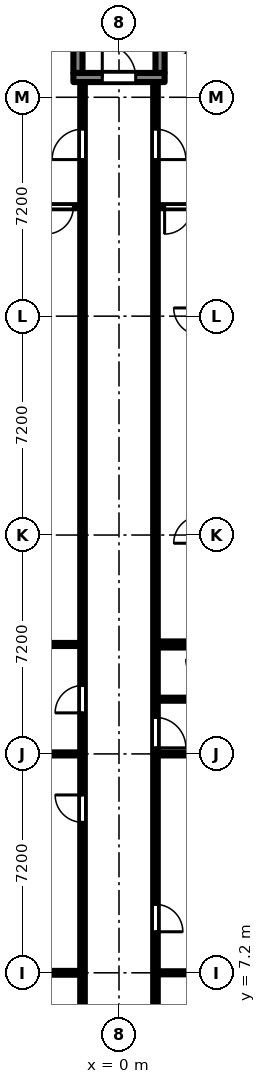
"""IFC4 building model, lengths in metres.
Left out: names, types, materials, properties, quantities, classifications, styles, units other than length and angle.
Written with IfcOpenShell. Run it as: python <this file> out.ifc"""

import sys

from ifc_helpers import new_model, si_unit, direction, frame, frame_2d, origin, place, context, subcontext, project, spatial, rectangle, extrude, element, fill, save


model = new_model("IFC4")
c1 = context("Model", 3, precision=1e-05, world=origin(), true_north=direction((0.0, 1.0)))
c2 = subcontext(c1, "Body", "Model", "MODEL_VIEW")
j1 = project(units=[si_unit("LENGTHUNIT", "METRE"), si_unit("PLANEANGLEUNIT", "RADIAN")], contexts=[c1])
p1 = place(None, origin())
s1 = spatial("IfcSite", under=j1, at=p1, CompositionType="ELEMENT")
p2 = place(p1, origin())
s2 = spatial("IfcBuilding", under=s1, at=p2, CompositionType="ELEMENT")
p3 = place(p2, frame((0.0, 0.0, 29.7)))
s3 = spatial("IfcBuildingStorey", under=s2, at=p3, CompositionType="ELEMENT", Elevation=29.7)
p4 = place(p3, frame((-1.5, 36.65, 0.0), z_axis=(0.0, 0.0, 1.0), x_axis=(1.0, 0.0, 0.0)))
e1 = element("IfcWall", 1, at=p4, inside=s3, PredefinedType="SHEAR", context=c2, shape_type="SweptSolid", body=[
    extrude(rectangle(XDim=3.0, YDim=0.3, at=frame_2d((1.5, 0.0))), origin(), (0.0, 0.0, 1.0), 2.575),
])
p5 = place(p4, frame((0.95, 0.0, 0.0)))
e2 = element("IfcOpeningElement", 2, at=p5, cuts=e1, PredefinedType="OPENING", context=c2, shape_type="SweptSolid", body=[
    extrude(rectangle(XDim=1.1, YDim=2.1, at=frame_2d((0.55, 1.05))), frame((0.0, 0.16, 0.0), z_axis=(0.0, -1.0, 0.0), x_axis=(1.0, 0.0, 0.0)), (0.0, 0.0, 1.0), 0.32),
])
for number, where, z_axis, x_axis in (
    (3, (-1.35, 36.8, 0.0), (0.0, 0.0, 1.0), (0.0, 1.0, 0.0)),
    (4, (1.35, 36.8, 0.0), (0.0, 0.0, 1.0), (0.0, 1.0, 0.0)),
):
    element("IfcWall", number, at=place(p3, frame(where, z_axis=z_axis, x_axis=x_axis)), inside=s3, PredefinedType="SHEAR", context=c2, shape_type="SweptSolid", body=[
        extrude(rectangle(XDim=5.8, YDim=0.3, at=frame_2d((2.9, 0.0))), origin(), (0.0, 0.0, 1.0), 2.575),
    ])
p6 = place(p3, frame((-6.9, 18.0, 0.0), z_axis=(0.0, 0.0, 1.0), x_axis=(1.0, 0.0, 0.0)))
e5 = element("IfcWall", 5, at=p6, inside=s3, PredefinedType="PARTITIONING", context=c2, shape_type="SweptSolid", body=[
    extrude(rectangle(XDim=5.625, YDim=0.1, at=frame_2d((2.812, 0.0))), origin(), (0.0, 0.0, 1.0), 2.575),
])
p7 = place(p3, frame((-6.9, 32.4, 0.0), z_axis=(0.0, 0.0, 1.0), x_axis=(1.0, 0.0, 0.0)))
e6 = element("IfcWall", 6, at=p7, inside=s3, PredefinedType="PARTITIONING", context=c2, shape_type="SweptSolid", body=[
    extrude(rectangle(XDim=5.625, YDim=0.1, at=frame_2d((2.812, 0.0))), origin(), (0.0, 0.0, 1.0), 2.575),
])
p8 = place(p7, frame((4.5, 0.0, 0.0)))
e7 = element("IfcOpeningElement", 7, at=p8, cuts=e6, PredefinedType="OPENING", context=c2, shape_type="SweptSolid", body=[
    extrude(rectangle(XDim=0.9, YDim=2.1, at=frame_2d((0.45, 1.05))), frame((0.0, 0.06, 0.0), z_axis=(0.0, -1.0, 0.0), x_axis=(1.0, 0.0, 0.0)), (0.0, 0.0, 1.0), 0.12),
])
p9 = place(p3, frame((-3.9, 7.2, 0.0), z_axis=(0.0, 0.0, 1.0), x_axis=(1.0, 0.0, 0.0)))
e8 = element("IfcWall", 8, at=p9, inside=s3, PredefinedType="PARTITIONING", context=c2, shape_type="SweptSolid", body=[
    extrude(rectangle(XDim=2.625, YDim=0.125, at=frame_2d((1.312, 0.0))), origin(), (0.0, 0.0, 1.0), 2.575),
])
p10 = place(p3, frame((-3.9, 14.4, 0.0), z_axis=(0.0, 0.0, 1.0), x_axis=(1.0, 0.0, 0.0)))
e9 = element("IfcWall", 9, at=p10, inside=s3, PredefinedType="PARTITIONING", context=c2, shape_type="SweptSolid", body=[
    extrude(rectangle(XDim=2.625, YDim=0.1, at=frame_2d((1.312, 0.0))), origin(), (0.0, 0.0, 1.0), 2.575),
])
p11 = place(p3, frame((-1.2, 1.125, 0.0), z_axis=(0.0, 0.0, 1.0), x_axis=(0.0, 1.0, 0.0)))
e10 = element("IfcWall", 10, at=p11, inside=s3, PredefinedType="PARTITIONING", context=c2, shape_type="SweptSolid", body=[
    extrude(rectangle(XDim=35.375, YDim=0.15, at=frame_2d((17.688, 0.0))), origin(), (0.0, 0.0, 1.0), 2.575),
])
p12 = place(p11, frame((2.625, 0.0, 0.0)))
e11 = element("IfcOpeningElement", 11, at=p12, cuts=e10, PredefinedType="OPENING", context=c2, shape_type="SweptSolid", body=[
    extrude(rectangle(XDim=0.9, YDim=2.1, at=frame_2d((0.45, 1.05))), frame((0.0, 0.085, 0.0), z_axis=(0.0, -1.0, 0.0), x_axis=(1.0, 0.0, 0.0)), (0.0, 0.0, 1.0), 0.17),
])
p13 = place(p11, frame((11.025, 0.0, 0.0)))
e12 = element("IfcOpeningElement", 12, at=p13, cuts=e10, PredefinedType="OPENING", context=c2, shape_type="SweptSolid", body=[
    extrude(rectangle(XDim=0.9, YDim=2.1, at=frame_2d((0.45, 1.05))), frame((0.0, 0.085, 0.0), z_axis=(0.0, -1.0, 0.0), x_axis=(1.0, 0.0, 0.0)), (0.0, 0.0, 1.0), 0.17),
])
p14 = place(p11, frame((14.625, 0.0, 0.0)))
e13 = element("IfcOpeningElement", 13, at=p14, cuts=e10, PredefinedType="OPENING", context=c2, shape_type="SweptSolid", body=[
    extrude(rectangle(XDim=0.9, YDim=2.1, at=frame_2d((0.45, 1.05))), frame((0.0, 0.085, 0.0), z_axis=(0.0, -1.0, 0.0), x_axis=(1.0, 0.0, 0.0)), (0.0, 0.0, 1.0), 0.17),
])
p15 = place(p11, frame((32.825, 0.0, 0.0)))
e14 = element("IfcOpeningElement", 14, at=p15, cuts=e10, PredefinedType="OPENING", context=c2, shape_type="SweptSolid", body=[
    extrude(rectangle(XDim=1.0, YDim=2.1, at=frame_2d((0.5, 1.05))), frame((0.0, 0.085, 0.0), z_axis=(0.0, -1.0, 0.0), x_axis=(1.0, 0.0, 0.0)), (0.0, 0.0, 1.0), 0.17),
])
p16 = place(p3, frame((1.2, 1.125, 0.0), z_axis=(0.0, 0.0, 1.0), x_axis=(0.0, 1.0, 0.0)))
e15 = element("IfcWall", 15, at=p16, inside=s3, PredefinedType="PARTITIONING", context=c2, shape_type="SweptSolid", body=[
    extrude(rectangle(XDim=35.375, YDim=0.15, at=frame_2d((17.688, 0.0))), origin(), (0.0, 0.0, 1.0), 2.575),
])
p17 = place(p16, frame((3.725, 0.0, 0.0)))
e16 = element("IfcOpeningElement", 16, at=p17, cuts=e15, PredefinedType="OPENING", context=c2, shape_type="SweptSolid", body=[
    extrude(rectangle(XDim=0.9, YDim=2.1, at=frame_2d((0.45, 1.05))), frame((0.0, 0.085, 0.0), z_axis=(0.0, -1.0, 0.0), x_axis=(1.0, 0.0, 0.0)), (0.0, 0.0, 1.0), 0.17),
])
p18 = place(p16, frame((7.425, 0.0, 0.0)))
e17 = element("IfcOpeningElement", 17, at=p18, cuts=e15, PredefinedType="OPENING", context=c2, shape_type="SweptSolid", body=[
    extrude(rectangle(XDim=0.9, YDim=2.1, at=frame_2d((0.45, 1.05))), frame((0.0, 0.085, 0.0), z_axis=(0.0, -1.0, 0.0), x_axis=(1.0, 0.0, 0.0)), (0.0, 0.0, 1.0), 0.17),
])
p19 = place(p16, frame((13.475, 0.0, 0.0)))
e18 = element("IfcOpeningElement", 18, at=p19, cuts=e15, PredefinedType="OPENING", context=c2, shape_type="SweptSolid", body=[
    extrude(rectangle(XDim=1.0, YDim=2.1, at=frame_2d((0.5, 1.05))), frame((0.0, 0.085, 0.0), z_axis=(0.0, -1.0, 0.0), x_axis=(1.0, 0.0, 0.0)), (0.0, 0.0, 1.0), 0.17),
])
p20 = place(p16, frame((32.825, 0.0, 0.0)))
e19 = element("IfcOpeningElement", 19, at=p20, cuts=e15, PredefinedType="OPENING", context=c2, shape_type="SweptSolid", body=[
    extrude(rectangle(XDim=1.0, YDim=2.1, at=frame_2d((0.5, 1.05))), frame((0.0, 0.085, 0.0), z_axis=(0.0, -1.0, 0.0), x_axis=(1.0, 0.0, 0.0)), (0.0, 0.0, 1.0), 0.17),
])
for number, where, z_axis, x_axis in (
    (20, (1.275, 7.2, 0.0), (0.0, 0.0, 1.0), (1.0, 0.0, 0.0)),
    (21, (1.275, 14.4, 0.0), (0.0, 0.0, 1.0), (1.0, 0.0, 0.0)),
):
    element("IfcWall", number, at=place(p3, frame(where, z_axis=z_axis, x_axis=x_axis)), inside=s3, PredefinedType="PARTITIONING", context=c2, shape_type="SweptSolid", body=[
        extrude(rectangle(XDim=2.625, YDim=0.1, at=frame_2d((1.312, 0.0))), origin(), (0.0, 0.0, 1.0), 2.575),
    ])
p21 = place(p3, frame((1.275, 16.2, 0.0), z_axis=(0.0, 0.0, 1.0), x_axis=(1.0, 0.0, 0.0)))
e22 = element("IfcWall", 22, at=p21, inside=s3, PredefinedType="PARTITIONING", context=c2, shape_type="SweptSolid", body=[
    extrude(rectangle(XDim=1.775, YDim=0.1, at=frame_2d((0.888, 0.0))), origin(), (0.0, 0.0, 1.0), 2.575),
])
p22 = place(p3, frame((1.275, 18.0, 0.0), z_axis=(0.0, 0.0, 1.0), x_axis=(1.0, 0.0, 0.0)))
e23 = element("IfcWall", 23, at=p22, inside=s3, PredefinedType="PARTITIONING", context=c2, shape_type="SweptSolid", body=[
    extrude(rectangle(XDim=1.475, YDim=0.2, at=frame_2d((0.738, 0.0))), origin(), (0.0, 0.0, 1.0), 2.575),
])
p23 = place(p3, frame((1.275, 32.4, 0.0), z_axis=(0.0, 0.0, 1.0), x_axis=(1.0, 0.0, 0.0)))
e24 = element("IfcWall", 24, at=p23, inside=s3, PredefinedType="PARTITIONING", context=c2, shape_type="SweptSolid", body=[
    extrude(rectangle(XDim=5.625, YDim=0.1, at=frame_2d((2.812, 0.0))), origin(), (0.0, 0.0, 1.0), 2.575),
])
p24 = place(p23, frame((0.225, 0.0, 0.0)))
e25 = element("IfcOpeningElement", 25, at=p24, cuts=e24, PredefinedType="OPENING", context=c2, shape_type="SweptSolid", body=[
    extrude(rectangle(XDim=0.9, YDim=2.1, at=frame_2d((0.45, 1.05))), frame((0.0, 0.06, 0.0), z_axis=(0.0, -1.0, 0.0), x_axis=(1.0, 0.0, 0.0)), (0.0, 0.0, 1.0), 0.12),
])
p25 = place(p5, origin())
e26 = element("IfcDoor", 26, at=p25, inside=s3, OperationType="SINGLE_SWING_LEFT", PredefinedType="DOOR", context=c2, shape_type="SweptSolid", body=[
    extrude(rectangle(XDim=1.1, YDim=2.1, at=frame_2d((0.55, 1.05))), frame((0.0, 0.025, 0.0), z_axis=(0.0, -1.0, 0.0), x_axis=(1.0, 0.0, 0.0)), (0.0, 0.0, 1.0), 0.05),
])
fill(e2, e26)
p26 = place(p13, origin())
e27 = element("IfcDoor", 27, at=p26, inside=s3, OperationType="SINGLE_SWING_RIGHT", PredefinedType="DOOR", context=c2, shape_type="SweptSolid", body=[
    extrude(rectangle(XDim=0.9, YDim=2.1, at=frame_2d((0.45, 1.05))), frame((0.0, 0.025, 0.0), z_axis=(0.0, -1.0, 0.0), x_axis=(1.0, 0.0, 0.0)), (0.0, 0.0, 1.0), 0.05),
])
fill(e12, e27)
p27 = place(p14, origin())
e28 = element("IfcDoor", 28, at=p27, inside=s3, OperationType="SINGLE_SWING_LEFT", PredefinedType="DOOR", context=c2, shape_type="SweptSolid", body=[
    extrude(rectangle(XDim=0.9, YDim=2.1, at=frame_2d((0.45, 1.05))), frame((0.0, 0.025, 0.0), z_axis=(0.0, -1.0, 0.0), x_axis=(1.0, 0.0, 0.0)), (0.0, 0.0, 1.0), 0.05),
])
fill(e13, e28)
p28 = place(p15, origin())
e29 = element("IfcDoor", 29, at=p28, inside=s3, OperationType="SINGLE_SWING_LEFT", PredefinedType="DOOR", context=c2, shape_type="SweptSolid", body=[
    extrude(rectangle(XDim=1.0, YDim=2.1, at=frame_2d((0.5, 1.05))), frame((0.0, 0.025, 0.0), z_axis=(0.0, -1.0, 0.0), x_axis=(1.0, 0.0, 0.0)), (0.0, 0.0, 1.0), 0.05),
])
fill(e14, e29)
p29 = place(p8, frame((0.9, 0.0, 0.0), z_axis=(0.0, 0.0, 1.0), x_axis=(-1.0, 0.0, 0.0)))
e30 = element("IfcDoor", 30, at=p29, inside=s3, OperationType="SINGLE_SWING_RIGHT", PredefinedType="DOOR", context=c2, shape_type="SweptSolid", body=[
    extrude(rectangle(XDim=0.9, YDim=2.1, at=frame_2d((0.45, 1.05))), frame((0.0, 0.025, 0.0), z_axis=(0.0, -1.0, 0.0), x_axis=(1.0, 0.0, 0.0)), (0.0, 0.0, 1.0), 0.05),
])
fill(e7, e30)
p30 = place(p18, frame((0.9, 0.0, 0.0), z_axis=(0.0, 0.0, 1.0), x_axis=(-1.0, 0.0, 0.0)))
e31 = element("IfcDoor", 31, at=p30, inside=s3, OperationType="SINGLE_SWING_RIGHT", PredefinedType="DOOR", context=c2, shape_type="SweptSolid", body=[
    extrude(rectangle(XDim=0.9, YDim=2.1, at=frame_2d((0.45, 1.05))), frame((0.0, 0.025, 0.0), z_axis=(0.0, -1.0, 0.0), x_axis=(1.0, 0.0, 0.0)), (0.0, 0.0, 1.0), 0.05),
])
fill(e17, e31)
p31 = place(p19, frame((1.0, 0.0, 0.0), z_axis=(0.0, 0.0, 1.0), x_axis=(-1.0, 0.0, 0.0)))
e32 = element("IfcDoor", 32, at=p31, inside=s3, OperationType="SINGLE_SWING_RIGHT", PredefinedType="DOOR", context=c2, shape_type="SweptSolid", body=[
    extrude(rectangle(XDim=1.0, YDim=2.1, at=frame_2d((0.5, 1.05))), frame((0.0, 0.025, 0.0), z_axis=(0.0, -1.0, 0.0), x_axis=(1.0, 0.0, 0.0)), (0.0, 0.0, 1.0), 0.05),
])
fill(e18, e32)
p32 = place(p20, frame((1.0, 0.0, 0.0), z_axis=(0.0, 0.0, 1.0), x_axis=(-1.0, 0.0, 0.0)))
e33 = element("IfcDoor", 33, at=p32, inside=s3, OperationType="SINGLE_SWING_RIGHT", PredefinedType="DOOR", context=c2, shape_type="SweptSolid", body=[
    extrude(rectangle(XDim=1.0, YDim=2.1, at=frame_2d((0.5, 1.05))), frame((0.0, 0.025, 0.0), z_axis=(0.0, -1.0, 0.0), x_axis=(1.0, 0.0, 0.0)), (0.0, 0.0, 1.0), 0.05),
])
fill(e19, e33)
p33 = place(p24, frame((0.9, 0.0, 0.0), z_axis=(0.0, 0.0, 1.0), x_axis=(-1.0, 0.0, 0.0)))
e34 = element("IfcDoor", 34, at=p33, inside=s3, OperationType="SINGLE_SWING_RIGHT", PredefinedType="DOOR", context=c2, shape_type="SweptSolid", body=[
    extrude(rectangle(XDim=0.9, YDim=2.1, at=frame_2d((0.45, 1.05))), frame((0.0, 0.025, 0.0), z_axis=(0.0, -1.0, 0.0), x_axis=(1.0, 0.0, 0.0)), (0.0, 0.0, 1.0), 0.05),
])
fill(e25, e34)
save(model, sys.argv[1])
